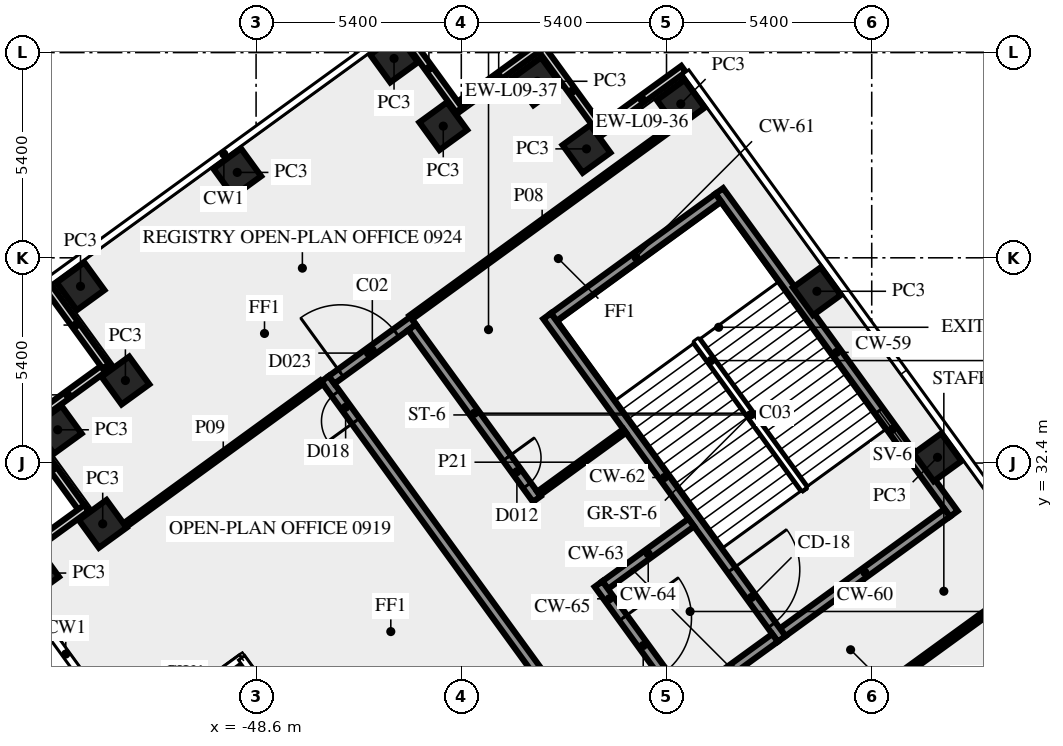
"""IFC4 building model, lengths in metres.
Left out: names, types, materials, properties, quantities, classifications, styles, units other than length and angle.
Written with IfcOpenShell. Run it as: python <this file> out.ifc"""

import sys

from ifc_helpers import new_model, si_unit, direction, frame, frame_2d, origin, origin_2d, place, context, subcontext, project, spatial, rectangle, extrude, element, fill, save


model = new_model("IFC4")
c1 = context("Model", 3, precision=1e-05, world=origin(), true_north=direction((0.0, 1.0)))
c2 = subcontext(c1, "Body", "Model", "MODEL_VIEW")
j1 = project(units=[si_unit("LENGTHUNIT", "METRE"), si_unit("PLANEANGLEUNIT", "RADIAN")], contexts=[c1])
p1 = place(None, origin())
s1 = spatial("IfcSite", under=j1, at=p1, CompositionType="ELEMENT")
p2 = place(p1, origin())
s2 = spatial("IfcBuilding", under=s1, at=p2, CompositionType="ELEMENT")
p3 = place(p2, frame((0.0, 0.0, 43.0)))
s3 = spatial("IfcBuildingStorey", under=s2, at=p3, CompositionType="ELEMENT", Elevation=43.0)
for number, where, z_axis, x_axis in (
    (1, (-30.669, 32.55, 0.0), (0.0, 0.0, 1.0), (-0.588, 0.809, 0.0)),
    (2, (-33.843, 36.919, 0.0), (0.0, 0.0, 1.0), (-0.588, 0.809, 0.0)),
    (3, (-37.425, 41.85, 0.0), (0.0, 0.0, 1.0), (-0.588, 0.809, 0.0)),
    (4, (-39.906, 40.666, 0.0), (0.0, 0.0, 1.0), (-0.588, 0.809, 0.0)),
    (5, (-41.2, 42.445, 0.0), (0.0, 0.0, 1.0), (-0.588, 0.809, 0.0)),
    (6, (-43.675, 41.265, 0.0), (0.0, 0.0, 1.0), (-0.809, -0.588, 0.0)),
    (7, (-44.97, 43.045, 0.0), (0.0, 0.0, 1.0), (-0.809, -0.588, 0.0)),
    (8, (-49.096, 40.047, 0.0), (0.0, 0.0, 1.0), (-0.809, -0.588, 0.0)),
    (9, (-53.22, 37.05, 0.0), (0.0, 0.0, 1.0), (0.588, -0.809, 0.0)),
    (10, (-52.039, 34.571, 0.0), (0.0, 0.0, 1.0), (-0.809, -0.588, 0.0)),
    (11, (-53.82, 33.275, 0.0), (0.0, 0.0, 1.0), (0.588, -0.809, 0.0)),
    (12, (-52.636, 30.8, 0.0), (0.0, 0.0, 1.0), (-0.809, -0.588, 0.0)),
    (13, (-54.415, 29.505, 0.0), (0.0, 0.0, 1.0), (0.588, -0.809, 0.0)),
):
    element("IfcColumn", number, at=place(p3, frame(where, z_axis=z_axis, x_axis=x_axis)), inside=s3, PredefinedType="COLUMN", context=c2, shape_type="SweptSolid", body=[
        extrude(rectangle(XDim=0.9, YDim=0.9, at=origin_2d()), origin(), (0.0, 0.0, 1.0), 3.65),
    ])
p4 = place(p3, frame((-52.465, 34.987, 0.0), z_axis=(0.0, 0.0, 1.0), x_axis=(-0.809033161865, -0.587762999008, 0.0)))
e14 = element("IfcWall", 14, at=p4, inside=s3, PredefinedType="SOLIDWALL", context=c2, shape_type="SweptSolid", body=[
    extrude(rectangle(XDim=2.7, YDim=0.2, at=frame_2d((1.35, 0.0))), origin(), (0.0, 0.0, 1.0), 3.65),
])
p5 = place(p3, frame((-54.738, 33.351, 0.0), z_axis=(0.0, 0.0, 1.0), x_axis=(0.587779184282, -0.809021403008, 0.0)))
e15 = element("IfcWall", 15, at=p5, inside=s3, PredefinedType="SOLIDWALL", context=c2, shape_type="SweptSolid", body=[
    extrude(rectangle(XDim=2.7, YDim=0.2, at=frame_2d((1.35, 0.0))), origin(), (0.0, 0.0, 1.0), 3.65),
])
p6 = place(p3, frame((-53.063, 31.216, 0.0), z_axis=(0.0, 0.0, 1.0), x_axis=(-0.80902431253, -0.587775179585, 0.0)))
e16 = element("IfcWall", 16, at=p6, inside=s3, PredefinedType="SOLIDWALL", context=c2, shape_type="SweptSolid", body=[
    extrude(rectangle(XDim=2.6, YDim=0.2, at=frame_2d((1.3, 0.0))), origin(), (0.0, 0.0, 1.0), 3.65),
])
p7 = place(p3, frame((-37.353, 42.768, 0.0), z_axis=(0.0, 0.0, 1.0), x_axis=(-0.809033161865, -0.587762999008, 0.0)))
e17 = element("IfcWall", 17, at=p7, inside=s3, PredefinedType="SOLIDWALL", context=c2, shape_type="SweptSolid", body=[
    extrude(rectangle(XDim=2.7, YDim=0.2, at=frame_2d((1.35, 0.0))), origin(), (0.0, 0.0, 1.0), 3.65),
])
p8 = place(p3, frame((-39.488, 41.094, 0.0), z_axis=(0.0, 0.0, 1.0), x_axis=(-0.587806000234, 0.809001919707, 0.0)))
e18 = element("IfcWall", 18, at=p8, inside=s3, PredefinedType="SOLIDWALL", context=c2, shape_type="SweptSolid", body=[
    extrude(rectangle(XDim=2.7, YDim=0.2, at=frame_2d((1.35, 0.0))), origin(), (0.0, 0.0, 1.0), 3.65),
])
for number, where, z_axis, x_axis in (
    (19, (-41.124, 43.366, 0.0), (0.0, 0.0, 1.0), (-0.809, -0.588, 0.0)),
    (20, (-43.259, 41.691, 0.0), (0.0, 0.0, 1.0), (-0.588, 0.809, 0.0)),
    (21, (-54.14, 37.123, 0.0), (0.0, 0.0, 1.0), (0.588, -0.809, 0.0)),
):
    element("IfcWall", number, at=place(p3, frame(where, z_axis=z_axis, x_axis=x_axis)), inside=s3, PredefinedType="SOLIDWALL", context=c2, shape_type="SweptSolid", body=[
        extrude(rectangle(XDim=2.7, YDim=0.2, at=frame_2d((1.35, 0.0))), origin(), (0.0, 0.0, 1.0), 3.65),
    ])
p9 = place(p3, frame((-30.24, 31.064, 0.0), z_axis=(0.0, 0.0, 1.0), x_axis=(-0.587795589702, 0.809009483706, 0.0)))
e22 = element("IfcWall", 22, at=p9, inside=s3, PredefinedType="SHEAR", context=c2, shape_type="SweptSolid", body=[
    extrude(rectangle(XDim=10.5, YDim=0.25, at=frame_2d((5.25, 0.0))), origin(), (0.0, 0.0, 1.0), 3.65),
])
p10 = place(p9, frame((2.15, 0.0, 1.0)))
e23 = element("IfcOpeningElement", 23, at=p10, cuts=e22, PredefinedType="OPENING", context=c2, shape_type="SweptSolid", body=[
    extrude(rectangle(XDim=1.2, YDim=1.2, at=frame_2d((0.6, 0.6))), frame((0.0, 0.135, 0.0), z_axis=(0.0, -1.0, 0.0), x_axis=(1.0, 0.0, 0.0)), (0.0, 0.0, 1.0), 0.27),
])
p11 = place(p3, frame((-30.414, 31.092, 0.0), z_axis=(0.0, 0.0, 1.0), x_axis=(-0.8089984606, -0.587810760999, 0.0)))
e24 = element("IfcWall", 24, at=p11, inside=s3, PredefinedType="SHEAR", context=c2, shape_type="SweptSolid", body=[
    extrude(rectangle(XDim=5.35, YDim=0.25, at=frame_2d((2.675, 0.0))), origin(), (0.0, 0.0, 1.0), 3.65),
])
p12 = place(p3, frame((-36.439, 39.384, 0.0), z_axis=(0.0, 0.0, 1.0), x_axis=(-0.809020161303, -0.587780893365, 0.0)))
e25 = element("IfcWall", 25, at=p12, inside=s3, PredefinedType="SHEAR", context=c2, shape_type="SweptSolid", body=[
    extrude(rectangle(XDim=5.35, YDim=0.25, at=frame_2d((2.675, 0.0))), origin(), (0.0, 0.0, 1.0), 3.65),
])
p13 = place(p3, frame((-40.942, 36.267, 0.0), z_axis=(0.0, 0.0, 1.0), x_axis=(0.587795589702, -0.809009483706, 0.0)))
e26 = element("IfcWall", 26, at=p13, inside=s3, PredefinedType="SHEAR", context=c2, shape_type="SweptSolid", body=[
    extrude(rectangle(XDim=10.5, YDim=0.25, at=frame_2d((5.25, 0.0))), origin(), (0.0, 0.0, 1.0), 3.65),
])
p14 = place(p13, frame((8.25, 0.0, 0.0)))
e27 = element("IfcOpeningElement", 27, at=p14, cuts=e26, PredefinedType="OPENING", context=c2, shape_type="SweptSolid", body=[
    extrude(rectangle(XDim=1.8, YDim=2.1, at=frame_2d((0.9, 1.05))), frame((0.0, 0.135, 0.0), z_axis=(0.0, -1.0, 0.0), x_axis=(1.0, 0.0, 0.0)), (0.0, 0.0, 1.0), 0.27),
])
for number, where, z_axis, x_axis in (
    (28, (-34.945, 27.8, 0.0), (0.0, 0.0, 1.0), (-0.809, -0.588, 0.0)),
    (29, (-37.149, 30.834, 0.0), (0.0, 0.0, 1.0), (-0.809, -0.588, 0.0)),
):
    element("IfcWall", number, at=place(p3, frame(where, z_axis=z_axis, x_axis=x_axis)), inside=s3, PredefinedType="SHEAR", context=c2, shape_type="SweptSolid", body=[
        extrude(rectangle(XDim=2.8, YDim=0.25, at=frame_2d((1.4, 0.0))), origin(), (0.0, 0.0, 1.0), 3.65),
    ])
p15 = place(p3, frame((-39.589, 29.216, 0.0), z_axis=(0.0, 0.0, 1.0), x_axis=(0.587772420479, -0.809026317077, 0.0)))
e30 = element("IfcWall", 30, at=p15, inside=s3, PredefinedType="SHEAR", context=c2, shape_type="SweptSolid", body=[
    extrude(rectangle(XDim=4.0, YDim=0.25, at=frame_2d((2.0, 0.0))), origin(), (0.0, 0.0, 1.0), 3.65),
])
p16 = place(p15, frame((1.1, 0.0, 0.0)))
e31 = element("IfcOpeningElement", 31, at=p16, cuts=e30, PredefinedType="OPENING", context=c2, shape_type="SweptSolid", body=[
    extrude(rectangle(XDim=1.8, YDim=2.1, at=frame_2d((0.9, 1.05))), frame((0.0, 0.135, 0.0), z_axis=(0.0, -1.0, 0.0), x_axis=(1.0, 0.0, 0.0)), (0.0, 0.0, 1.0), 0.27),
])
p17 = place(p3, frame((-20.531, -1.523, 0.0), z_axis=(0.0, 0.0, 1.0), x_axis=(-0.587784593204, 0.809017473231, 0.0)))
e32 = element("IfcWall", 32, at=p17, inside=s3, PredefinedType="SOLIDWALL", context=c2, shape_type="SweptSolid", body=[
    extrude(rectangle(XDim=44.67, YDim=0.25, at=frame_2d((22.335, 0.0))), origin(), (0.0, 0.0, 1.0), 3.65),
])
p18 = place(p17, frame((26.14, 0.0, 0.0)))
e33 = element("IfcOpeningElement", 33, at=p18, cuts=e32, PredefinedType="OPENING", context=c2, shape_type="SweptSolid", body=[
    extrude(rectangle(XDim=1.8, YDim=2.1, at=frame_2d((0.9, 1.05))), frame((0.0, 0.135, 0.0), z_axis=(0.0, -1.0, 0.0), x_axis=(1.0, 0.0, 0.0)), (0.0, 0.0, 1.0), 0.27),
])
p19 = place(p17, frame((43.296, 0.0, 0.0)))
e34 = element("IfcOpeningElement", 34, at=p19, cuts=e32, PredefinedType="OPENING", context=c2, shape_type="SweptSolid", body=[
    extrude(rectangle(XDim=0.9, YDim=2.1, at=frame_2d((0.45, 1.05))), frame((0.0, 0.135, 0.0), z_axis=(0.0, -1.0, 0.0), x_axis=(1.0, 0.0, 0.0)), (0.0, 0.0, 1.0), 0.27),
])
p20 = place(p17, frame((13.216, 0.0, 0.0)))
e35 = element("IfcOpeningElement", 35, at=p20, cuts=e32, PredefinedType="OPENING", context=c2, shape_type="SweptSolid", body=[
    extrude(rectangle(XDim=0.9, YDim=2.1, at=frame_2d((0.45, 1.05))), frame((0.0, 0.135, 0.0), z_axis=(0.0, -1.0, 0.0), x_axis=(1.0, 0.0, 0.0)), (0.0, 0.0, 1.0), 0.27),
])
p21 = place(p17, frame((7.816, 0.0, 0.0)))
e36 = element("IfcOpeningElement", 36, at=p21, cuts=e32, PredefinedType="OPENING", context=c2, shape_type="SweptSolid", body=[
    extrude(rectangle(XDim=0.9, YDim=2.1, at=frame_2d((0.45, 1.05))), frame((0.0, 0.135, 0.0), z_axis=(0.0, -1.0, 0.0), x_axis=(1.0, 0.0, 0.0)), (0.0, 0.0, 1.0), 0.27),
])
p22 = place(p17, frame((0.533, 0.0, 0.0)))
e37 = element("IfcOpeningElement", 37, at=p22, cuts=e32, PredefinedType="OPENING", context=c2, shape_type="SweptSolid", body=[
    extrude(rectangle(XDim=0.9, YDim=2.1, at=frame_2d((0.45, 1.05))), frame((0.0, 0.135, 0.0), z_axis=(0.0, -1.0, 0.0), x_axis=(1.0, 0.0, 0.0)), (0.0, 0.0, 1.0), 0.27),
])
p23 = place(p3, frame((-46.613, 34.588, 0.0), z_axis=(0.0, 0.0, 1.0), x_axis=(0.808994936898, 0.587815610607, 0.0)))
e38 = element("IfcWall", 38, at=p23, inside=s3, PredefinedType="SOLIDWALL", context=c2, shape_type="SweptSolid", body=[
    extrude(rectangle(XDim=2.65, YDim=0.25, at=frame_2d((1.325, 0.0))), origin(), (0.0, 0.0, 1.0), 3.65),
])
p24 = place(p23, frame((0.299, 0.0, 0.0)))
e39 = element("IfcOpeningElement", 39, at=p24, cuts=e38, PredefinedType="OPENING", context=c2, shape_type="SweptSolid", body=[
    extrude(rectangle(XDim=1.8, YDim=2.1, at=frame_2d((0.9, 1.05))), frame((0.0, 0.135, 0.0), z_axis=(0.0, -1.0, 0.0), x_axis=(1.0, 0.0, 0.0)), (0.0, 0.0, 1.0), 0.27),
])
p25 = place(p3, frame((-44.497, 35.971, 0.0), z_axis=(0.0, 0.0, 1.0), x_axis=(0.587742866856, -0.809047787501, 0.0)))
e40 = element("IfcWall", 40, at=p25, inside=s3, PredefinedType="SOLIDWALL", context=c2, shape_type="SweptSolid", body=[
    extrude(rectangle(XDim=5.586, YDim=0.25, at=frame_2d((2.793, 0.0))), origin(), (0.0, 0.0, 1.0), 3.65),
])
p26 = place(p25, frame((4.245, 0.0, 0.0)))
e41 = element("IfcOpeningElement", 41, at=p26, cuts=e40, PredefinedType="OPENING", context=c2, shape_type="SweptSolid", body=[
    extrude(rectangle(XDim=0.9, YDim=2.1, at=frame_2d((0.45, 1.05))), frame((0.0, 0.135, 0.0), z_axis=(0.0, -1.0, 0.0), x_axis=(1.0, 0.0, 0.0)), (0.0, 0.0, 1.0), 0.27),
])
p27 = place(p3, frame((-37.614, 41.257, 0.0), z_axis=(0.0, 0.0, 1.0), x_axis=(-0.808991595707, -0.587820208972, 0.0)))
e42 = element("IfcWall", 42, at=p27, inside=s3, PredefinedType="PARTITIONING", context=c2, shape_type="SweptSolid", body=[
    extrude(rectangle(XDim=8.551, YDim=0.12, at=frame_2d((4.275, 0.0))), origin(), (0.0, 0.0, 1.0), 3.65),
])
p28 = place(p3, frame((-46.877, 34.526, 0.0), z_axis=(0.0, 0.0, 1.0), x_axis=(-0.808993566199, -0.587817497059, 0.0)))
e43 = element("IfcWall", 43, at=p28, inside=s3, PredefinedType="PARTITIONING", context=c2, shape_type="SweptSolid", body=[
    extrude(rectangle(XDim=6.395, YDim=0.12, at=frame_2d((3.197, 0.0))), origin(), (0.0, 0.0, 1.0), 3.65),
])
p29 = place(p3, frame((-27.873, 29.551, 0.0), z_axis=(0.0, 0.0, 1.0), x_axis=(-0.809043311713, -0.587749027879, 0.0)))
e44 = element("IfcWall", 44, at=p29, inside=s3, PredefinedType="PARTITIONING", context=c2, shape_type="SweptSolid", body=[
    extrude(rectangle(XDim=9.55, YDim=0.15, at=frame_2d((4.775, 0.0))), origin(), (0.0, 0.0, 1.0), 2.75),
])
p30 = place(p3, frame((-41.166, 31.599, 0.0), z_axis=(0.0, 0.0, 1.0), x_axis=(0.809090262332, 0.587684394381, 0.0)))
e45 = element("IfcWall", 45, at=p30, inside=s3, PredefinedType="PARTITIONING", context=c2, shape_type="SweptSolid", body=[
    extrude(rectangle(XDim=2.801, YDim=0.12, at=frame_2d((1.4, 0.0))), origin(), (0.0, 0.0, 1.0), 3.65),
])
p31 = place(p10, origin())
e46 = element("IfcWindow", 46, at=p31, inside=s3, PartitioningType="SINGLE_PANEL", PredefinedType="WINDOW", context=c2, shape_type="SweptSolid", body=[
    extrude(rectangle(XDim=1.2, YDim=1.2, at=frame_2d((0.6, 0.6))), frame((0.0, 0.03, 0.0), z_axis=(0.0, -1.0, 0.0), x_axis=(1.0, 0.0, 0.0)), (0.0, 0.0, 1.0), 0.06),
])
fill(e23, e46)
p32 = place(p14, origin())
e47 = element("IfcDoor", 47, at=p32, inside=s3, OperationType="DOUBLE_DOOR_SINGLE_SWING", PredefinedType="DOOR", context=c2, shape_type="SweptSolid", body=[
    extrude(rectangle(XDim=1.8, YDim=2.1, at=frame_2d((0.9, 1.05))), frame((0.0, 0.025, 0.0), z_axis=(0.0, -1.0, 0.0), x_axis=(1.0, 0.0, 0.0)), (0.0, 0.0, 1.0), 0.05),
])
fill(e27, e47)
p33 = place(p16, origin())
e48 = element("IfcDoor", 48, at=p33, inside=s3, OperationType="DOUBLE_DOOR_SINGLE_SWING", PredefinedType="DOOR", context=c2, shape_type="SweptSolid", body=[
    extrude(rectangle(XDim=1.8, YDim=2.1, at=frame_2d((0.9, 1.05))), frame((0.0, 0.025, 0.0), z_axis=(0.0, -1.0, 0.0), x_axis=(1.0, 0.0, 0.0)), (0.0, 0.0, 1.0), 0.05),
])
fill(e31, e48)
p34 = place(p26, origin())
e49 = element("IfcDoor", 49, at=p34, inside=s3, OperationType="SINGLE_SWING_RIGHT", PredefinedType="DOOR", context=c2, shape_type="SweptSolid", body=[
    extrude(rectangle(XDim=0.9, YDim=2.1, at=frame_2d((0.45, 1.05))), frame((0.0, 0.025, 0.0), z_axis=(0.0, -1.0, 0.0), x_axis=(1.0, 0.0, 0.0)), (0.0, 0.0, 1.0), 0.05),
])
fill(e41, e49)
p35 = place(p19, origin())
e50 = element("IfcDoor", 50, at=p35, inside=s3, OperationType="SINGLE_SWING_RIGHT", PredefinedType="DOOR", context=c2, shape_type="SweptSolid", body=[
    extrude(rectangle(XDim=0.9, YDim=2.1, at=frame_2d((0.45, 1.05))), frame((0.0, 0.025, 0.0), z_axis=(0.0, -1.0, 0.0), x_axis=(1.0, 0.0, 0.0)), (0.0, 0.0, 1.0), 0.05),
])
fill(e34, e50)
p36 = place(p24, origin())
e51 = element("IfcDoor", 51, at=p36, inside=s3, OperationType="DOUBLE_DOOR_SINGLE_SWING", PredefinedType="DOOR", context=c2, shape_type="SweptSolid", body=[
    extrude(rectangle(XDim=1.8, YDim=2.1, at=frame_2d((0.9, 1.05))), frame((0.0, 0.025, 0.0), z_axis=(0.0, -1.0, 0.0), x_axis=(1.0, 0.0, 0.0)), (0.0, 0.0, 1.0), 0.05),
])
fill(e39, e51)
save(model, sys.argv[1])
